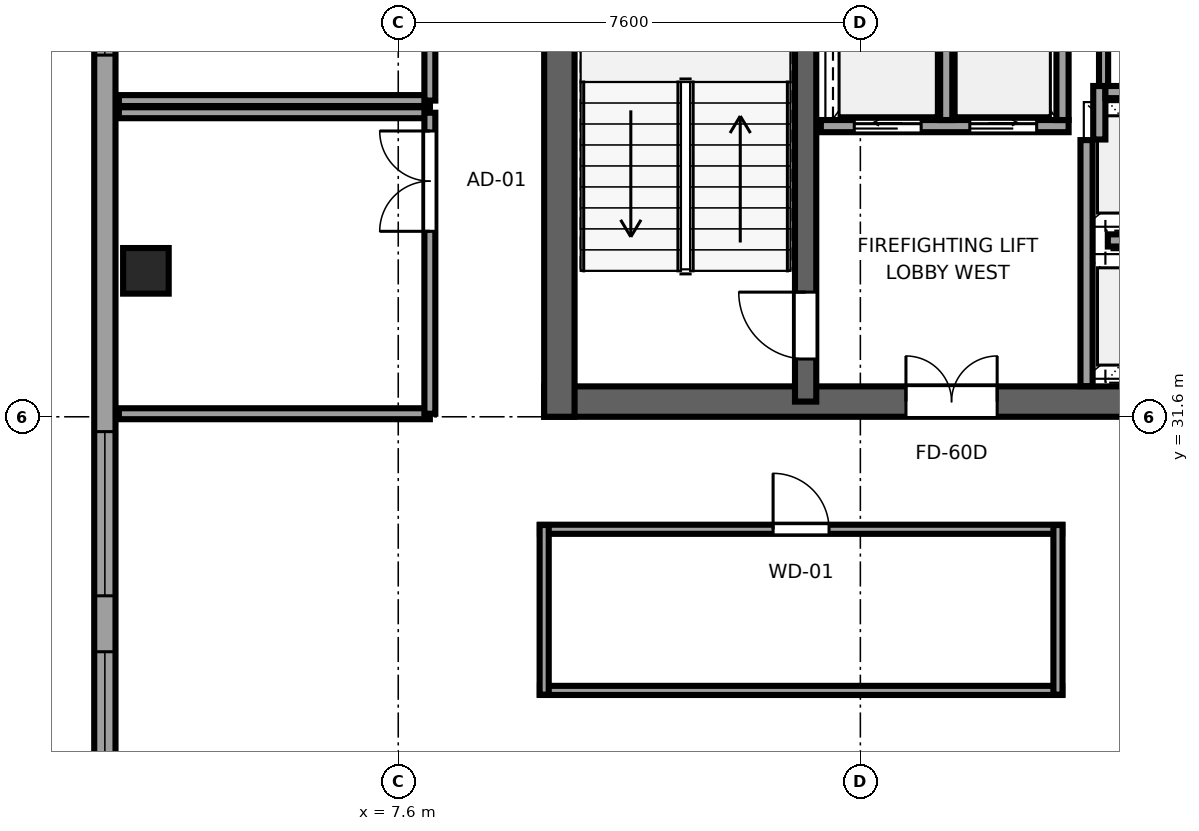
"""IFC4 building model, lengths in metres.
Left out: names, types, materials, properties, quantities, classifications, styles, units other than length and angle.
Written with IfcOpenShell. Run it as: python <this file> out.ifc"""

import sys

from ifc_helpers import new_model, si_unit, direction, frame, frame_2d, origin, origin_2d, place, context, subcontext, project, spatial, rectangle, extrude, source, transform, mapped, element, fill, save


model = new_model("IFC4")
c1 = context("Model", 3, precision=1e-05, world=origin(), true_north=direction((0.0, 1.0)))
c2 = subcontext(c1, "Body", "Model", "MODEL_VIEW")
j1 = project(units=[si_unit("LENGTHUNIT", "METRE"), si_unit("PLANEANGLEUNIT", "RADIAN")], contexts=[c1])
p1 = place(None, origin())
s1 = spatial("IfcSite", under=j1, at=p1, CompositionType="ELEMENT")
p2 = place(p1, origin())
s2 = spatial("IfcBuilding", under=s1, at=p2, CompositionType="ELEMENT")
p3 = place(p2, frame((0.0, 0.0, 231.0)))
s3 = spatial("IfcBuildingStorey", under=s2, at=p3, CompositionType="ELEMENT", Elevation=231.0)
p4 = place(p3, frame((10.0, 31.85, 0.0), z_axis=(0.0, 0.0, 1.0), x_axis=(1.0, 0.0, 0.0)))
e1 = element("IfcWall", 1, at=p4, inside=s3, PredefinedType="SHEAR", context=c2, shape_type="SweptSolid", body=[
    extrude(rectangle(XDim=26.0, YDim=0.5, at=frame_2d((13.0, 0.0))), origin(), (0.0, 0.0, 1.0), 3.55),
])
p5 = place(p4, frame((7.45, 0.0, 0.0), z_axis=(0.0, 0.0, 1.0), x_axis=(-1.0, 0.0, 0.0)))
e2 = element("IfcOpeningElement", 2, at=p5, cuts=e1, PredefinedType="OPENING", context=c2, shape_type="SweptSolid", body=[
    extrude(rectangle(XDim=1.5, YDim=2.04, at=frame_2d((0.75, 1.02))), frame((0.0, 0.26, 0.0), z_axis=(0.0, -1.0, 0.0), x_axis=(1.0, 0.0, 0.0)), (0.0, 0.0, 1.0), 0.52),
])
p6 = place(p4, frame((13.75, 0.0, 0.0), z_axis=(0.0, 0.0, 1.0), x_axis=(-1.0, 0.0, 0.0)))
e3 = element("IfcOpeningElement", 3, at=p6, cuts=e1, PredefinedType="OPENING", context=c2, shape_type="SweptSolid", body=[
    extrude(rectangle(XDim=1.5, YDim=2.04, at=frame_2d((0.75, 1.02))), frame((0.0, 0.26, 0.0), z_axis=(0.0, -1.0, 0.0), x_axis=(1.0, 0.0, 0.0)), (0.0, 0.0, 1.0), 0.52),
])
p7 = place(p4, frame((20.05, 0.0, 0.0), z_axis=(0.0, 0.0, 1.0), x_axis=(-1.0, 0.0, 0.0)))
e4 = element("IfcOpeningElement", 4, at=p7, cuts=e1, PredefinedType="OPENING", context=c2, shape_type="SweptSolid", body=[
    extrude(rectangle(XDim=1.5, YDim=2.04, at=frame_2d((0.75, 1.02))), frame((0.0, 0.26, 0.0), z_axis=(0.0, -1.0, 0.0), x_axis=(1.0, 0.0, 0.0)), (0.0, 0.0, 1.0), 0.52),
])
p8 = place(p3, frame((10.25, 31.6, 0.0), z_axis=(0.0, 0.0, 1.0), x_axis=(0.0, 1.0, 0.0)))
e5 = element("IfcWall", 5, at=p8, inside=s3, PredefinedType="SHEAR", context=c2, shape_type="SweptSolid", body=[
    extrude(rectangle(XDim=13.6, YDim=0.5, at=frame_2d((6.8, 0.0))), origin(), (0.0, 0.0, 1.0), 3.55),
])
p9 = place(p3, frame((14.3, 31.85, 0.0), z_axis=(0.0, 0.0, 1.0), x_axis=(0.0, 1.0, 0.0)))
e6 = element("IfcWall", 6, at=p9, inside=s3, PredefinedType="SHEAR", context=c2, shape_type="SweptSolid", body=[
    extrude(rectangle(XDim=13.1, YDim=0.35, at=frame_2d((6.55, 0.0))), origin(), (0.0, 0.0, 1.0), 3.55),
])
p10 = place(p9, frame((0.7, 0.0, 0.0)))
e7 = element("IfcOpeningElement", 7, at=p10, cuts=e6, PredefinedType="OPENING", context=c2, shape_type="SweptSolid", body=[
    extrude(rectangle(XDim=1.1, YDim=2.12, at=frame_2d((0.55, 1.06))), frame((0.0, 0.185, 0.0), z_axis=(0.0, -1.0, 0.0), x_axis=(1.0, 0.0, 0.0)), (0.0, 0.0, 1.0), 0.37),
])
m1 = source(origin(), c2, "Body", "SweptSolid", [
    extrude(rectangle(XDim=0.75, YDim=0.75, at=origin_2d()), origin(), (0.0, 0.0, 1.0), 3.55),
])
p11 = place(p3, frame((3.45, 34.0, 0.0), z_axis=(0.0, 0.0, 1.0), x_axis=(1.0, 0.0, 0.0)))
e8 = element("IfcColumn", 8, at=p11, inside=s3, PredefinedType="COLUMN", context=c2, shape_type="MappedRepresentation", body=[
    mapped(m1, transform((0.0, 0.0, 0.0), x_axis=(1.0, 0.0, 0.0), y_axis=(0.0, 1.0, 0.0), z_axis=(0.0, 0.0, 1.0), scale=1.0)),
])
p12 = place(p3, frame((2.775, 41.583, 0.0), z_axis=(0.0, 0.0, 1.0), x_axis=(0.0, -1.0, 0.0)))
e9 = element("IfcWall", 9, at=p12, inside=s3, PredefinedType="SOLIDWALL", context=c2, shape_type="SweptSolid", body=[
    extrude(rectangle(XDim=34.566, YDim=0.35, at=frame_2d((17.283, 0.0))), origin(), (0.0, 0.0, 1.0), 3.37),
])
p13 = place(p12, frame((1.335, 0.0, 0.68)))
e10 = element("IfcOpeningElement", 10, at=p13, cuts=e9, PredefinedType="OPENING", context=c2, shape_type="SweptSolid", body=[
    extrude(rectangle(XDim=2.7, YDim=1.95, at=frame_2d((1.35, 0.975))), frame((0.0, 0.185, 0.0), z_axis=(0.0, -1.0, 0.0), x_axis=(1.0, 0.0, 0.0)), (0.0, 0.0, 1.0), 0.37),
])
p14 = place(p12, frame((10.227, 0.0, 0.68)))
e11 = element("IfcOpeningElement", 11, at=p14, cuts=e9, PredefinedType="OPENING", context=c2, shape_type="SweptSolid", body=[
    extrude(rectangle(XDim=2.7, YDim=1.95, at=frame_2d((1.35, 0.975))), frame((0.0, 0.185, 0.0), z_axis=(0.0, -1.0, 0.0), x_axis=(1.0, 0.0, 0.0)), (0.0, 0.0, 1.0), 0.37),
])
p15 = place(p12, frame((13.847, 0.0, 0.68)))
e12 = element("IfcOpeningElement", 12, at=p15, cuts=e9, PredefinedType="OPENING", context=c2, shape_type="SweptSolid", body=[
    extrude(rectangle(XDim=2.7, YDim=1.95, at=frame_2d((1.35, 0.975))), frame((0.0, 0.185, 0.0), z_axis=(0.0, -1.0, 0.0), x_axis=(1.0, 0.0, 0.0)), (0.0, 0.0, 1.0), 0.37),
])
p16 = place(p12, frame((18.568, 0.0, 0.68)))
e13 = element("IfcOpeningElement", 13, at=p16, cuts=e9, PredefinedType="OPENING", context=c2, shape_type="SweptSolid", body=[
    extrude(rectangle(XDim=2.7, YDim=1.95, at=frame_2d((1.35, 0.975))), frame((0.0, 0.185, 0.0), z_axis=(0.0, -1.0, 0.0), x_axis=(1.0, 0.0, 0.0)), (0.0, 0.0, 1.0), 0.37),
])
p17 = place(p12, frame((26.36, 0.0, 0.68)))
e14 = element("IfcOpeningElement", 14, at=p17, cuts=e9, PredefinedType="OPENING", context=c2, shape_type="SweptSolid", body=[
    extrude(rectangle(XDim=2.7, YDim=1.95, at=frame_2d((1.35, 0.975))), frame((0.0, 0.185, 0.0), z_axis=(0.0, -1.0, 0.0), x_axis=(1.0, 0.0, 0.0)), (0.0, 0.0, 1.0), 0.37),
])
p18 = place(p3, frame((18.92, 32.104, 0.0), z_axis=(0.0, 0.0, 1.0), x_axis=(0.0, 1.0, 0.0)))
e15 = element("IfcWall", 15, at=p18, inside=s3, PredefinedType="SOLIDWALL", context=c2, shape_type="SweptSolid", body=[
    extrude(rectangle(XDim=4.046, YDim=0.2, at=frame_2d((2.023, 0.0))), origin(), (0.0, 0.0, 1.0), 3.37),
])
p19 = place(p3, frame((19.13, 36.16, 0.0), z_axis=(0.0, 0.0, 1.0), x_axis=(0.0, 1.0, 0.0)))
e16 = element("IfcWall", 16, at=p19, inside=s3, PredefinedType="SOLIDWALL", context=c2, shape_type="SweptSolid", body=[
    extrude(rectangle(XDim=0.88, YDim=0.2, at=frame_2d((0.44, 0.0))), origin(), (0.0, 0.0, 1.0), 3.37),
])
p20 = place(p3, frame((19.23, 36.94, 0.0), z_axis=(0.0, 0.0, 1.0), x_axis=(1.0, 0.0, 0.0)))
e17 = element("IfcWall", 17, at=p20, inside=s3, PredefinedType="SOLIDWALL", context=c2, shape_type="SweptSolid", body=[
    extrude(rectangle(XDim=1.84, YDim=0.2, at=frame_2d((0.92, 0.0))), origin(), (0.0, 0.0, 1.0), 3.37),
])
p21 = place(p3, frame((19.27, 34.5, 0.0), z_axis=(0.0, 0.0, 1.0), x_axis=(1.0, 0.0, 0.0)))
e18 = element("IfcWall", 18, at=p21, inside=s3, PredefinedType="SOLIDWALL", context=c2, shape_type="SweptSolid", body=[
    extrude(rectangle(XDim=1.8, YDim=0.2, at=frame_2d((0.9, 0.0))), origin(), (0.0, 0.0, 1.0), 3.37),
])
p22 = place(p3, frame((14.55, 36.38, 0.0), z_axis=(0.0, 0.0, 1.0), x_axis=(1.0, 0.0, 0.0)))
e19 = element("IfcWall", 19, at=p22, inside=s3, PredefinedType="SOLIDWALL", context=c2, shape_type="SweptSolid", body=[
    extrude(rectangle(XDim=4.075, YDim=0.2, at=frame_2d((2.038, 0.0))), origin(), (0.0, 0.0, 1.0), 3.37),
])
p23 = place(p22, frame((0.55, 0.0, 0.0)))
e20 = element("IfcOpeningElement", 20, at=p23, cuts=e19, PredefinedType="OPENING", context=c2, shape_type="SweptSolid", body=[
    extrude(rectangle(XDim=1.1, YDim=2.12, at=frame_2d((0.55, 1.06))), frame((0.0, 0.11, 0.0), z_axis=(0.0, -1.0, 0.0), x_axis=(1.0, 0.0, 0.0)), (0.0, 0.0, 1.0), 0.22),
])
p24 = place(p22, frame((2.45, 0.0, 0.0)))
e21 = element("IfcOpeningElement", 21, at=p24, cuts=e19, PredefinedType="OPENING", context=c2, shape_type="SweptSolid", body=[
    extrude(rectangle(XDim=1.1, YDim=2.12, at=frame_2d((0.55, 1.06))), frame((0.0, 0.11, 0.0), z_axis=(0.0, -1.0, 0.0), x_axis=(1.0, 0.0, 0.0)), (0.0, 0.0, 1.0), 0.22),
])
for number, where, z_axis, x_axis in (
    (22, (18.525, 36.48, 0.0), (0.0, 0.0, 1.0), (0.0, 1.0, 0.0)),
    (23, (16.613, 36.48, 0.0), (0.0, 0.0, 1.0), (0.0, 1.0, 0.0)),
):
    element("IfcWall", number, at=place(p3, frame(where, z_axis=z_axis, x_axis=x_axis)), inside=s3, PredefinedType="SOLIDWALL", context=c2, shape_type="SweptSolid", body=[
        extrude(rectangle(XDim=2.54, YDim=0.2, at=frame_2d((1.27, 0.0))), origin(), (0.0, 0.0, 1.0), 3.37),
    ])
p25 = place(p3, frame((19.2, 37.04, 0.0), z_axis=(0.0, 0.0, 1.0), x_axis=(0.0, 1.0, 0.0)))
e24 = element("IfcWall", 24, at=p25, inside=s3, PredefinedType="PARTITIONING", context=c2, shape_type="SweptSolid", body=[
    extrude(rectangle(XDim=4.86, YDim=0.15, at=frame_2d((2.43, 0.0))), origin(), (0.0, 0.0, 1.0), 3.37),
])
for number, where, z_axis, x_axis in (
    (25, (3.005, 31.65, 0.0), (0.0, 0.0, 1.0), (1.0, 0.0, 0.0)),
    (26, (3.005, 36.6, 0.0), (0.0, 0.0, 1.0), (1.0, 0.0, 0.0)),
):
    element("IfcWall", number, at=place(p3, frame(where, z_axis=z_axis, x_axis=x_axis)), inside=s3, PredefinedType="PARTITIONING", context=c2, shape_type="SweptSolid", body=[
        extrude(rectangle(XDim=5.115, YDim=0.18, at=frame_2d((2.558, 0.0))), origin(), (0.0, 0.0, 1.0), 3.37),
    ])
p26 = place(p3, frame((8.12, 31.65, 0.0), z_axis=(0.0, 0.0, 1.0), x_axis=(0.0, 1.0, 0.0)))
e27 = element("IfcWall", 27, at=p26, inside=s3, PredefinedType="PARTITIONING", context=c2, shape_type="SweptSolid", body=[
    extrude(rectangle(XDim=4.95, YDim=0.18, at=frame_2d((2.475, 0.0))), origin(), (0.0, 0.0, 1.0), 3.37),
])
p27 = place(p26, frame((3.0, 0.0, 0.0)))
e28 = element("IfcOpeningElement", 28, at=p27, cuts=e27, PredefinedType="OPENING", context=c2, shape_type="SweptSolid", body=[
    extrude(rectangle(XDim=1.65, YDim=2.15, at=frame_2d((0.825, 1.075))), frame((0.0, 0.1, 0.0), z_axis=(0.0, -1.0, 0.0), x_axis=(1.0, 0.0, 0.0)), (0.0, 0.0, 1.0), 0.2),
])
p28 = place(p3, frame((3.005, 36.8, 0.0), z_axis=(0.0, 0.0, 1.0), x_axis=(1.0, 0.0, 0.0)))
e29 = element("IfcWall", 29, at=p28, inside=s3, PredefinedType="PARTITIONING", context=c2, shape_type="SweptSolid", body=[
    extrude(rectangle(XDim=5.115, YDim=0.18, at=frame_2d((2.558, 0.0))), origin(), (0.0, 0.0, 1.0), 3.37),
])
p29 = place(p3, frame((8.12, 36.8, 0.0), z_axis=(0.0, 0.0, 1.0), x_axis=(0.0, 1.0, 0.0)))
e30 = element("IfcWall", 30, at=p29, inside=s3, PredefinedType="PARTITIONING", context=c2, shape_type="SweptSolid", body=[
    extrude(rectangle(XDim=8.795, YDim=0.18, at=frame_2d((4.397, 0.0))), origin(), (0.0, 0.0, 1.0), 3.37),
])
p30 = place(p29, frame((3.573, 0.0, 0.0)))
e31 = element("IfcOpeningElement", 31, at=p30, cuts=e30, PredefinedType="OPENING", context=c2, shape_type="SweptSolid", body=[
    extrude(rectangle(XDim=1.65, YDim=2.15, at=frame_2d((0.825, 1.075))), frame((0.0, 0.1, 0.0), z_axis=(0.0, -1.0, 0.0), x_axis=(1.0, 0.0, 0.0)), (0.0, 0.0, 1.0), 0.2),
])
p31 = place(p3, frame((9.93, 27.1, 0.0), z_axis=(0.0, 0.0, 1.0), x_axis=(1.0, 0.0, 0.0)))
e32 = element("IfcWall", 32, at=p31, inside=s3, PredefinedType="PARTITIONING", context=c2, shape_type="SweptSolid", body=[
    extrude(rectangle(XDim=8.59, YDim=0.15, at=frame_2d((4.295, 0.0))), origin(), (0.0, 0.0, 1.0), 3.37),
])
p32 = place(p3, frame((9.93, 29.75, 0.0), z_axis=(0.0, 0.0, 1.0), x_axis=(1.0, 0.0, 0.0)))
e33 = element("IfcWall", 33, at=p32, inside=s3, PredefinedType="PARTITIONING", context=c2, shape_type="SweptSolid", body=[
    extrude(rectangle(XDim=8.59, YDim=0.15, at=frame_2d((4.295, 0.0))), origin(), (0.0, 0.0, 1.0), 3.37),
])
p33 = place(p32, frame((3.835, 0.0, 0.0)))
e34 = element("IfcOpeningElement", 34, at=p33, cuts=e33, PredefinedType="OPENING", context=c2, shape_type="SweptSolid", body=[
    extrude(rectangle(XDim=0.92, YDim=2.01, at=frame_2d((0.46, 1.005))), frame((0.0, 0.085, 0.0), z_axis=(0.0, -1.0, 0.0), x_axis=(1.0, 0.0, 0.0)), (0.0, 0.0, 1.0), 0.17),
])
for number, where, z_axis, x_axis in (
    (35, (10.0, 27.03, 0.0), (0.0, 0.0, 1.0), (0.0, 1.0, 0.0)),
    (36, (18.45, 27.03, 0.0), (0.0, 0.0, 1.0), (0.0, 1.0, 0.0)),
):
    element("IfcWall", number, at=place(p3, frame(where, z_axis=z_axis, x_axis=x_axis)), inside=s3, PredefinedType="PARTITIONING", context=c2, shape_type="SweptSolid", body=[
        extrude(rectangle(XDim=2.79, YDim=0.15, at=frame_2d((1.395, 0.0))), origin(), (0.0, 0.0, 1.0), 3.37),
    ])
m2 = source(origin(), c2, "Body", "SweptSolid", [
    extrude(rectangle(XDim=2.7, YDim=1.95, at=frame_2d((1.35, 0.975))), frame((0.0, 0.09, 0.0), z_axis=(0.0, -1.0, 0.0), x_axis=(1.0, 0.0, 0.0)), (0.0, 0.0, 1.0), 0.06),
])
p34 = place(p13, origin())
e37 = element("IfcWindow", 37, at=p34, inside=s3, PartitioningType="TRIPLE_PANEL_HORIZONTAL", PredefinedType="WINDOW", context=c2, shape_type="MappedRepresentation", body=[
    mapped(m2, transform((0.0, 0.0, 0.0), x_axis=(1.0, 0.0, 0.0), y_axis=(0.0, 1.0, 0.0), z_axis=(0.0, 0.0, 1.0), scale=1.0)),
])
fill(e10, e37)
p35 = place(p14, origin())
e38 = element("IfcWindow", 38, at=p35, inside=s3, PartitioningType="TRIPLE_PANEL_HORIZONTAL", PredefinedType="WINDOW", context=c2, shape_type="MappedRepresentation", body=[
    mapped(m2, transform((0.0, 0.0, 0.0), x_axis=(1.0, 0.0, 0.0), y_axis=(0.0, 1.0, 0.0), z_axis=(0.0, 0.0, 1.0), scale=1.0)),
])
fill(e11, e38)
p36 = place(p15, origin())
e39 = element("IfcWindow", 39, at=p36, inside=s3, PartitioningType="TRIPLE_PANEL_HORIZONTAL", PredefinedType="WINDOW", context=c2, shape_type="MappedRepresentation", body=[
    mapped(m2, transform((0.0, 0.0, 0.0), x_axis=(1.0, 0.0, 0.0), y_axis=(0.0, 1.0, 0.0), z_axis=(0.0, 0.0, 1.0), scale=1.0)),
])
fill(e12, e39)
m3 = source(origin(), c2, "Body", "SweptSolid", [
    extrude(rectangle(XDim=1.1, YDim=2.12, at=frame_2d((0.55, 1.06))), frame((0.0, 0.025, 0.0), z_axis=(0.0, -1.0, 0.0), x_axis=(1.0, 0.0, 0.0)), (0.0, 0.0, 1.0), 0.05),
])
p37 = place(p10, origin())
e40 = element("IfcDoor", 40, at=p37, inside=s3, OperationType="SINGLE_SWING_RIGHT", PredefinedType="DOOR", context=c2, shape_type="MappedRepresentation", body=[
    mapped(m3, transform((0.0, 0.0, 0.0), x_axis=(1.0, 0.0, 0.0), y_axis=(0.0, 1.0, 0.0), z_axis=(0.0, 0.0, 1.0), scale=1.0)),
])
fill(e7, e40)
m4 = source(origin(), c2, "Body", "SweptSolid", [
    extrude(rectangle(XDim=1.5, YDim=2.04, at=frame_2d((0.75, 1.02))), frame((0.0, 0.025, 0.0), z_axis=(0.0, -1.0, 0.0), x_axis=(1.0, 0.0, 0.0)), (0.0, 0.0, 1.0), 0.05),
])
p38 = place(p5, origin())
e41 = element("IfcDoor", 41, at=p38, inside=s3, OperationType="DOUBLE_DOOR_SINGLE_SWING", PredefinedType="DOOR", context=c2, shape_type="MappedRepresentation", body=[
    mapped(m4, transform((0.0, 0.0, 0.0), x_axis=(1.0, 0.0, 0.0), y_axis=(0.0, 1.0, 0.0), z_axis=(0.0, 0.0, 1.0), scale=1.0)),
])
fill(e2, e41)
m5 = source(origin(), c2, "Body", "SweptSolid", [
    extrude(rectangle(XDim=1.1, YDim=2.12, at=frame_2d((0.55, 1.06))), frame((0.0, 0.025, 0.0), z_axis=(0.0, -1.0, 0.0), x_axis=(1.0, 0.0, 0.0)), (0.0, 0.0, 1.0), 0.05),
])
p39 = place(p23, origin())
e42 = element("IfcDoor", 42, at=p39, inside=s3, OperationType="SLIDING_TO_LEFT", PredefinedType="DOOR", context=c2, shape_type="MappedRepresentation", body=[
    mapped(m5, transform((0.0, 0.0, 0.0), x_axis=(1.0, 0.0, 0.0), y_axis=(0.0, 1.0, 0.0), z_axis=(0.0, 0.0, 1.0), scale=1.0)),
])
fill(e20, e42)
p40 = place(p24, origin())
e43 = element("IfcDoor", 43, at=p40, inside=s3, OperationType="SLIDING_TO_RIGHT", PredefinedType="DOOR", context=c2, shape_type="MappedRepresentation", body=[
    mapped(m5, transform((0.0, 0.0, 0.0), x_axis=(1.0, 0.0, 0.0), y_axis=(0.0, 1.0, 0.0), z_axis=(0.0, 0.0, 1.0), scale=1.0)),
])
fill(e21, e43)
m6 = source(origin(), c2, "Body", "SweptSolid", [
    extrude(rectangle(XDim=1.65, YDim=2.15, at=frame_2d((0.825, 1.075))), frame((0.0, 0.025, 0.0), z_axis=(0.0, -1.0, 0.0), x_axis=(1.0, 0.0, 0.0)), (0.0, 0.0, 1.0), 0.05),
])
p41 = place(p27, origin())
e44 = element("IfcDoor", 44, at=p41, inside=s3, OperationType="DOUBLE_DOOR_SINGLE_SWING", PredefinedType="DOOR", context=c2, shape_type="MappedRepresentation", body=[
    mapped(m6, transform((0.0, 0.0, 0.0), x_axis=(1.0, 0.0, 0.0), y_axis=(0.0, 1.0, 0.0), z_axis=(0.0, 0.0, 1.0), scale=1.0)),
])
fill(e28, e44)
m7 = source(origin(), c2, "Body", "SweptSolid", [
    extrude(rectangle(XDim=0.92, YDim=2.01, at=frame_2d((0.46, 1.005))), frame((0.0, 0.025, 0.0), z_axis=(0.0, -1.0, 0.0), x_axis=(1.0, 0.0, 0.0)), (0.0, 0.0, 1.0), 0.05),
])
p42 = place(p33, origin())
e45 = element("IfcDoor", 45, at=p42, inside=s3, OperationType="SINGLE_SWING_LEFT", PredefinedType="DOOR", context=c2, shape_type="MappedRepresentation", body=[
    mapped(m7, transform((0.0, 0.0, 0.0), x_axis=(1.0, 0.0, 0.0), y_axis=(0.0, 1.0, 0.0), z_axis=(0.0, 0.0, 1.0), scale=1.0)),
])
fill(e34, e45)
save(model, sys.argv[1])
